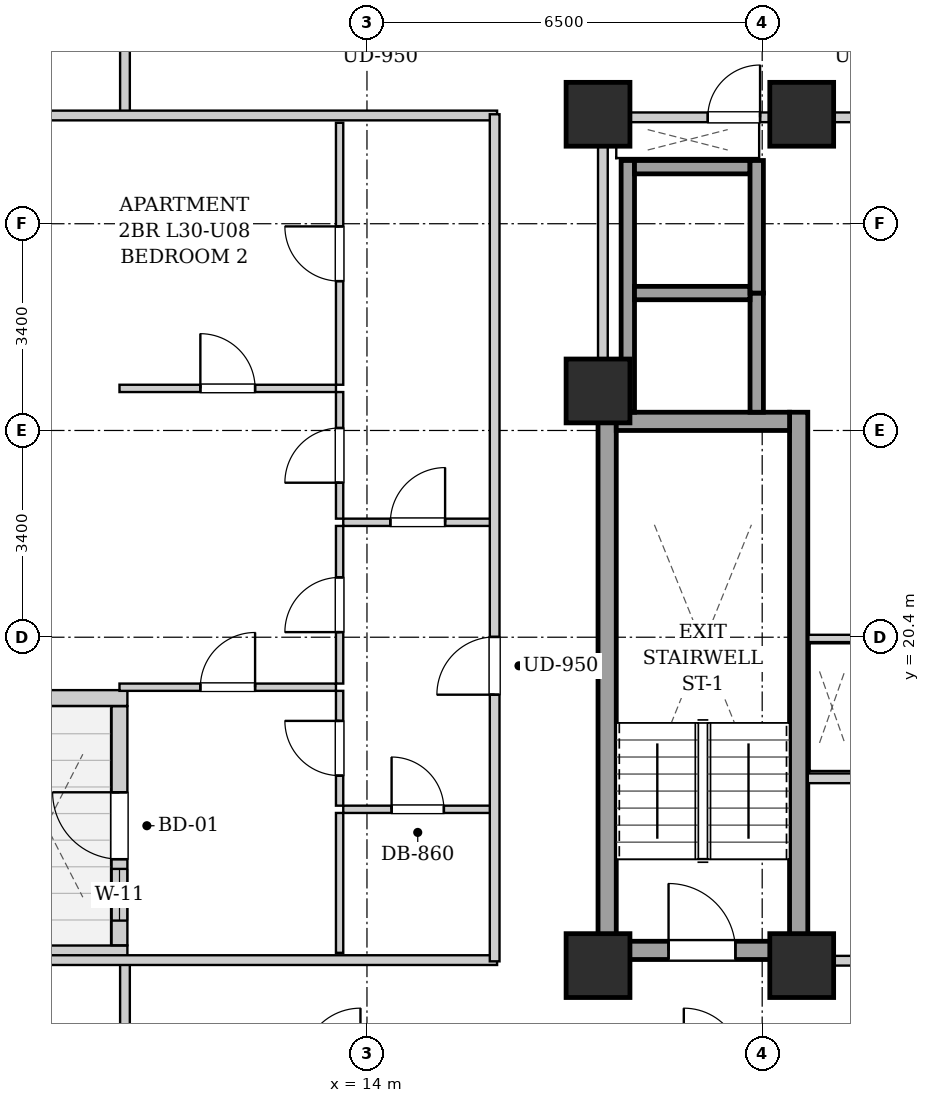
"""IFC4 building model, lengths in metres.
Left out: names, types, materials, properties, quantities, classifications, styles, units other than length and angle.
Written with IfcOpenShell. Run it as: python <this file> out.ifc"""

import sys

from ifc_helpers import new_model, si_unit, direction, frame, frame_2d, origin, origin_2d, place, context, subcontext, project, spatial, rectangle, extrude, element, fill, save


model = new_model("IFC4")
c1 = context("Model", 3, precision=1e-05, world=origin(), true_north=direction((0.0, 1.0)))
c2 = subcontext(c1, "Body", "Model", "MODEL_VIEW")
j1 = project(units=[si_unit("LENGTHUNIT", "METRE"), si_unit("PLANEANGLEUNIT", "RADIAN")], contexts=[c1])
p1 = place(None, origin())
s1 = spatial("IfcSite", under=j1, at=p1, CompositionType="ELEMENT")
p2 = place(p1, origin())
s2 = spatial("IfcBuilding", under=s1, at=p2, CompositionType="ELEMENT")
p3 = place(p2, frame((0.0, 0.0, 107.1)))
s3 = spatial("IfcBuildingStorey", under=s2, at=p3, CompositionType="ELEMENT", Elevation=107.1)
for number, where, z_axis, x_axis in (
    (1, (17.8, 15.0, 0.0), (0.0, 0.0, 1.0), (1.0, 0.0, 0.0)),
    (2, (21.15, 15.0, 0.0), (0.0, 0.0, 1.0), (1.0, 0.0, 0.0)),
    (3, (17.8, 29.0, 0.0), (0.0, 0.0, 1.0), (1.0, 0.0, 0.0)),
    (4, (21.15, 29.0, 0.0), (0.0, 0.0, 1.0), (1.0, 0.0, 0.0)),
    (5, (17.8, 24.45, 0.0), (0.0, 0.0, 1.0), (1.0, 0.0, 0.0)),
):
    element("IfcColumn", number, at=place(p3, frame(where, z_axis=z_axis, x_axis=x_axis)), inside=s3, PredefinedType="COLUMN", context=c2, shape_type="SweptSolid", body=[
        extrude(rectangle(XDim=1.05, YDim=1.05, at=origin_2d()), origin(), (0.0, 0.0, 1.0), 3.2),
    ])
p4 = place(p3, frame((7.66, 15.2, 0.0), z_axis=(0.0, 0.0, 1.0), x_axis=(1.0, 0.0, 0.0)))
e6 = element("IfcWall", 6, at=p4, inside=s3, PredefinedType="SOLIDWALL", context=c2, shape_type="SweptSolid", body=[
    extrude(rectangle(XDim=2.4, YDim=0.26, at=frame_2d((1.2, 0.0))), origin(), (0.0, 0.0, 1.0), 2.94),
])
p5 = place(p3, frame((9.93, 15.334, 0.0), z_axis=(0.0, 0.0, 1.0), x_axis=(0.0, 1.0, 0.0)))
e7 = element("IfcWall", 7, at=p5, inside=s3, PredefinedType="SOLIDWALL", context=c2, shape_type="SweptSolid", body=[
    extrude(rectangle(XDim=3.932, YDim=0.26, at=frame_2d((1.966, 0.0))), origin(), (0.0, 0.0, 1.0), 2.94),
])
p6 = place(p5, frame((1.416, 0.0, 0.0)))
e8 = element("IfcOpeningElement", 8, at=p6, cuts=e7, PredefinedType="OPENING", context=c2, shape_type="SweptSolid", body=[
    extrude(rectangle(XDim=1.1, YDim=2.0, at=frame_2d((0.55, 1.0))), frame((0.0, 0.14, 0.0), z_axis=(0.0, -1.0, 0.0), x_axis=(1.0, 0.0, 0.0)), (0.0, 0.0, 1.0), 0.28),
])
p7 = place(p5, frame((0.406, 0.0, 0.55)))
e9 = element("IfcOpeningElement", 9, at=p7, cuts=e7, PredefinedType="OPENING", context=c2, shape_type="SweptSolid", body=[
    extrude(rectangle(XDim=0.85, YDim=1.2, at=frame_2d((0.425, 0.6))), frame((0.0, 0.14, 0.0), z_axis=(0.0, -1.0, 0.0), x_axis=(1.0, 0.0, 0.0)), (0.0, 0.0, 1.0), 0.28),
])
p8 = place(p3, frame((10.06, 19.4, 0.0), z_axis=(0.0, 0.0, 1.0), x_axis=(-1.0, 0.0, 0.0)))
e10 = element("IfcWall", 10, at=p8, inside=s3, PredefinedType="SOLIDWALL", context=c2, shape_type="SweptSolid", body=[
    extrude(rectangle(XDim=2.4, YDim=0.26, at=frame_2d((1.2, 0.0))), origin(), (0.0, 0.0, 1.0), 2.94),
])
for number, where, z_axis, x_axis in (
    (11, (17.95, 15.1, 0.0), (0.0, 0.0, 1.0), (0.0, 1.0, 0.0)),
    (12, (21.1, 15.1, 0.0), (0.0, 0.0, 1.0), (0.0, 1.0, 0.0)),
):
    element("IfcWall", number, at=place(p3, frame(where, z_axis=z_axis, x_axis=x_axis)), inside=s3, PredefinedType="SHEAR", context=c2, shape_type="SweptSolid", body=[
        extrude(rectangle(XDim=9.0, YDim=0.3, at=frame_2d((4.5, 0.0))), origin(), (0.0, 0.0, 1.0), 2.94),
    ])
p9 = place(p3, frame((18.1, 23.95, 0.0), z_axis=(0.0, 0.0, 1.0), x_axis=(1.0, 0.0, 0.0)))
e13 = element("IfcWall", 13, at=p9, inside=s3, PredefinedType="SHEAR", context=c2, shape_type="SweptSolid", body=[
    extrude(rectangle(XDim=2.85, YDim=0.3, at=frame_2d((1.425, 0.0))), origin(), (0.0, 0.0, 1.0), 2.94),
])
p10 = place(p3, frame((18.1, 15.25, 0.0), z_axis=(0.0, 0.0, 1.0), x_axis=(1.0, 0.0, 0.0)))
e14 = element("IfcWall", 14, at=p10, inside=s3, PredefinedType="SHEAR", context=c2, shape_type="SweptSolid", body=[
    extrude(rectangle(XDim=2.85, YDim=0.3, at=frame_2d((1.425, 0.0))), origin(), (0.0, 0.0, 1.0), 2.94),
])
p11 = place(p10, frame((0.86, 0.0, 0.0)))
e15 = element("IfcOpeningElement", 15, at=p11, cuts=e14, PredefinedType="OPENING", context=c2, shape_type="SweptSolid", body=[
    extrude(rectangle(XDim=1.1, YDim=2.05, at=frame_2d((0.55, 1.025))), frame((0.0, 0.16, 0.0), z_axis=(0.0, -1.0, 0.0), x_axis=(1.0, 0.0, 0.0)), (0.0, 0.0, 1.0), 0.32),
])
p12 = place(p3, frame((18.29, 24.1, 0.0), z_axis=(0.0, 0.0, 1.0), x_axis=(0.0, 1.0, 0.0)))
e16 = element("IfcWall", 16, at=p12, inside=s3, PredefinedType="SHEAR", context=c2, shape_type="SweptSolid", body=[
    extrude(rectangle(XDim=4.14, YDim=0.22, at=frame_2d((2.07, 0.0))), origin(), (0.0, 0.0, 1.0), 2.94),
])
p13 = place(p3, frame((20.41, 24.1, 0.0), z_axis=(0.0, 0.0, 1.0), x_axis=(0.0, 1.0, 0.0)))
e17 = element("IfcWall", 17, at=p13, inside=s3, PredefinedType="SHEAR", context=c2, shape_type="SweptSolid", body=[
    extrude(rectangle(XDim=1.96, YDim=0.22, at=frame_2d((0.98, 0.0))), origin(), (0.0, 0.0, 1.0), 2.94),
])
for number, where, z_axis, x_axis in (
    (18, (18.4, 26.06, 0.0), (0.0, 0.0, 1.0), (1.0, 0.0, 0.0)),
    (19, (18.4, 28.13, 0.0), (0.0, 0.0, 1.0), (1.0, 0.0, 0.0)),
):
    element("IfcWall", number, at=place(p3, frame(where, z_axis=z_axis, x_axis=x_axis)), inside=s3, PredefinedType="SHEAR", context=c2, shape_type="SweptSolid", body=[
        extrude(rectangle(XDim=1.9, YDim=0.22, at=frame_2d((0.95, 0.0))), origin(), (0.0, 0.0, 1.0), 2.94),
    ])
p14 = place(p3, frame((20.41, 26.06, 0.0), z_axis=(0.0, 0.0, 1.0), x_axis=(0.0, 1.0, 0.0)))
e20 = element("IfcWall", 20, at=p14, inside=s3, PredefinedType="SHEAR", context=c2, shape_type="SweptSolid", body=[
    extrude(rectangle(XDim=2.18, YDim=0.22, at=frame_2d((1.09, 0.0))), origin(), (0.0, 0.0, 1.0), 2.94),
])
p15 = place(p3, frame((21.25, 15.08, 0.0), z_axis=(0.0, 0.0, 1.0), x_axis=(1.0, 0.0, 0.0)))
e21 = element("IfcWall", 21, at=p15, inside=s3, PredefinedType="PARTITIONING", context=c2, shape_type="SweptSolid", body=[
    extrude(rectangle(XDim=8.5, YDim=0.16, at=frame_2d((4.25, 0.0))), origin(), (0.0, 0.0, 1.0), 2.313),
])
p16 = place(p15, frame((3.725, 0.0, 0.0)))
e22 = element("IfcOpeningElement", 22, at=p16, cuts=e21, PredefinedType="OPENING", context=c2, shape_type="SweptSolid", body=[
    extrude(rectangle(XDim=1.05, YDim=2.05, at=frame_2d((0.525, 1.025))), frame((0.0, 0.09, 0.0), z_axis=(0.0, -1.0, 0.0), x_axis=(1.0, 0.0, 0.0)), (0.0, 0.0, 1.0), 0.18),
])
p17 = place(p3, frame((21.25, 18.08, 0.0), z_axis=(0.0, 0.0, 1.0), x_axis=(1.0, 0.0, 0.0)))
e23 = element("IfcWall", 23, at=p17, inside=s3, PredefinedType="PARTITIONING", context=c2, shape_type="SweptSolid", body=[
    extrude(rectangle(XDim=1.1, YDim=0.16, at=frame_2d((0.55, 0.0))), origin(), (0.0, 0.0, 1.0), 2.94),
])
p18 = place(p3, frame((17.88, 24.12, 0.0), z_axis=(0.0, 0.0, 1.0), x_axis=(0.0, 1.0, 0.0)))
e24 = element("IfcWall", 24, at=p18, inside=s3, PredefinedType="PARTITIONING", context=c2, shape_type="SweptSolid", body=[
    extrude(rectangle(XDim=4.76, YDim=0.16, at=frame_2d((2.38, 0.0))), origin(), (0.0, 0.0, 1.0), 2.275),
])
p19 = place(p3, frame((17.96, 28.95, 0.0), z_axis=(0.0, 0.0, 1.0), x_axis=(1.0, 0.0, 0.0)))
e25 = element("IfcWall", 25, at=p19, inside=s3, PredefinedType="PARTITIONING", context=c2, shape_type="SweptSolid", body=[
    extrude(rectangle(XDim=4.29, YDim=0.16, at=frame_2d((2.145, 0.0))), origin(), (0.0, 0.0, 1.0), 2.313),
])
p20 = place(p19, frame((1.645, 0.0, 0.0)))
e26 = element("IfcOpeningElement", 26, at=p20, cuts=e25, PredefinedType="OPENING", context=c2, shape_type="SweptSolid", body=[
    extrude(rectangle(XDim=0.86, YDim=2.05, at=frame_2d((0.43, 1.025))), frame((0.0, 0.09, 0.0), z_axis=(0.0, -1.0, 0.0), x_axis=(1.0, 0.0, 0.0)), (0.0, 0.0, 1.0), 0.18),
])
p21 = place(p3, frame((22.28, 20.38, 0.0), z_axis=(0.0, 0.0, 1.0), x_axis=(-1.0, 0.0, 0.0)))
e27 = element("IfcWall", 27, at=p21, inside=s3, PredefinedType="PARTITIONING", context=c2, shape_type="SweptSolid", body=[
    extrude(rectangle(XDim=1.02, YDim=0.12, at=frame_2d((0.51, 0.0))), origin(), (0.0, 0.0, 1.0), 2.94),
])
for number, where, z_axis, x_axis in (
    (28, (10.02, 13.35, 0.0), (0.0, 0.0, 1.0), (0.0, 1.0, 0.0)),
    (29, (10.02, 28.98, 0.0), (0.0, 0.0, 1.0), (0.0, 1.0, 0.0)),
):
    element("IfcWall", number, at=place(p3, frame(where, z_axis=z_axis, x_axis=x_axis)), inside=s3, PredefinedType="PARTITIONING", context=c2, shape_type="SweptSolid", body=[
        extrude(rectangle(XDim=1.74, YDim=0.16, at=frame_2d((0.87, 0.0))), origin(), (0.0, 0.0, 1.0), 2.94),
    ])
for number, where, z_axis, x_axis in (
    (30, (7.78, 15.09, 0.0), (0.0, 0.0, 1.0), (1.0, 0.0, 0.0)),
    (31, (7.78, 28.98, 0.0), (0.0, 0.0, 1.0), (1.0, 0.0, 0.0)),
):
    element("IfcWall", number, at=place(p3, frame(where, z_axis=z_axis, x_axis=x_axis)), inside=s3, PredefinedType="PARTITIONING", context=c2, shape_type="SweptSolid", body=[
        extrude(rectangle(XDim=8.36, YDim=0.16, at=frame_2d((4.18, 0.0))), origin(), (0.0, 0.0, 1.0), 2.313),
    ])
p22 = place(p3, frame((13.61, 22.29, 0.0), z_axis=(0.0, 0.0, 1.0), x_axis=(1.0, 0.0, 0.0)))
e32 = element("IfcWall", 32, at=p22, inside=s3, PredefinedType="PARTITIONING", context=c2, shape_type="SweptSolid", body=[
    extrude(rectangle(XDim=2.45, YDim=0.12, at=frame_2d((1.225, 0.0))), origin(), (0.0, 0.0, 1.0), 2.94),
])
p23 = place(p22, frame((0.775, 0.0, 0.0)))
e33 = element("IfcOpeningElement", 33, at=p23, cuts=e32, PredefinedType="OPENING", context=c2, shape_type="SweptSolid", body=[
    extrude(rectangle(XDim=0.9, YDim=2.05, at=frame_2d((0.45, 1.025))), frame((0.0, 0.07, 0.0), z_axis=(0.0, -1.0, 0.0), x_axis=(1.0, 0.0, 0.0)), (0.0, 0.0, 1.0), 0.14),
])
p24 = place(p3, frame((13.55, 22.35, 0.0), z_axis=(0.0, 0.0, 1.0), x_axis=(0.0, 1.0, 0.0)))
e34 = element("IfcWall", 34, at=p24, inside=s3, PredefinedType="PARTITIONING", context=c2, shape_type="SweptSolid", body=[
    extrude(rectangle(XDim=2.082, YDim=0.12, at=frame_2d((1.041, 0.0))), origin(), (0.0, 0.0, 1.0), 2.94),
])
p25 = place(p24, frame((0.591, 0.0, 0.0)))
e35 = element("IfcOpeningElement", 35, at=p25, cuts=e34, PredefinedType="OPENING", context=c2, shape_type="SweptSolid", body=[
    extrude(rectangle(XDim=0.9, YDim=2.05, at=frame_2d((0.45, 1.025))), frame((0.0, 0.07, 0.0), z_axis=(0.0, -1.0, 0.0), x_axis=(1.0, 0.0, 0.0)), (0.0, 0.0, 1.0), 0.14),
])
p26 = place(p3, frame((13.55, 24.552, 0.0), z_axis=(0.0, 0.0, 1.0), x_axis=(0.0, 1.0, 0.0)))
e36 = element("IfcWall", 36, at=p26, inside=s3, PredefinedType="PARTITIONING", context=c2, shape_type="SweptSolid", body=[
    extrude(rectangle(XDim=4.308, YDim=0.12, at=frame_2d((2.154, 0.0))), origin(), (0.0, 0.0, 1.0), 2.94),
])
p27 = place(p26, frame((1.704, 0.0, 0.0)))
e37 = element("IfcOpeningElement", 37, at=p27, cuts=e36, PredefinedType="OPENING", context=c2, shape_type="SweptSolid", body=[
    extrude(rectangle(XDim=0.9, YDim=2.05, at=frame_2d((0.45, 1.025))), frame((0.0, 0.07, 0.0), z_axis=(0.0, -1.0, 0.0), x_axis=(1.0, 0.0, 0.0)), (0.0, 0.0, 1.0), 0.14),
])
p28 = place(p3, frame((13.61, 17.57, 0.0), z_axis=(0.0, 0.0, 1.0), x_axis=(1.0, 0.0, 0.0)))
e38 = element("IfcWall", 38, at=p28, inside=s3, PredefinedType="PARTITIONING", context=c2, shape_type="SweptSolid", body=[
    extrude(rectangle(XDim=2.45, YDim=0.12, at=frame_2d((1.225, 0.0))), origin(), (0.0, 0.0, 1.0), 2.94),
])
p29 = place(p28, frame((0.795, 0.0, 0.0)))
e39 = element("IfcOpeningElement", 39, at=p29, cuts=e38, PredefinedType="OPENING", context=c2, shape_type="SweptSolid", body=[
    extrude(rectangle(XDim=0.86, YDim=2.05, at=frame_2d((0.43, 1.025))), frame((0.0, 0.07, 0.0), z_axis=(0.0, -1.0, 0.0), x_axis=(1.0, 0.0, 0.0)), (0.0, 0.0, 1.0), 0.14),
])
p30 = place(p3, frame((13.55, 15.21, 0.0), z_axis=(0.0, 0.0, 1.0), x_axis=(0.0, 1.0, 0.0)))
e40 = element("IfcWall", 40, at=p30, inside=s3, PredefinedType="PARTITIONING", context=c2, shape_type="SweptSolid", body=[
    extrude(rectangle(XDim=2.3, YDim=0.12, at=frame_2d((1.15, 0.0))), origin(), (0.0, 0.0, 1.0), 2.94),
])
p31 = place(p3, frame((13.55, 17.63, 0.0), z_axis=(0.0, 0.0, 1.0), x_axis=(0.0, 1.0, 0.0)))
e41 = element("IfcWall", 41, at=p31, inside=s3, PredefinedType="PARTITIONING", context=c2, shape_type="SweptSolid", body=[
    extrude(rectangle(XDim=1.888, YDim=0.12, at=frame_2d((0.944, 0.0))), origin(), (0.0, 0.0, 1.0), 2.94),
])
p32 = place(p31, frame((0.494, 0.0, 0.0)))
e42 = element("IfcOpeningElement", 42, at=p32, cuts=e41, PredefinedType="OPENING", context=c2, shape_type="SweptSolid", body=[
    extrude(rectangle(XDim=0.9, YDim=2.05, at=frame_2d((0.45, 1.025))), frame((0.0, 0.07, 0.0), z_axis=(0.0, -1.0, 0.0), x_axis=(1.0, 0.0, 0.0)), (0.0, 0.0, 1.0), 0.14),
])
p33 = place(p3, frame((13.55, 19.638, 0.0), z_axis=(0.0, 0.0, 1.0), x_axis=(0.0, 1.0, 0.0)))
e43 = element("IfcWall", 43, at=p33, inside=s3, PredefinedType="PARTITIONING", context=c2, shape_type="SweptSolid", body=[
    extrude(rectangle(XDim=2.592, YDim=0.12, at=frame_2d((1.296, 0.0))), origin(), (0.0, 0.0, 1.0), 2.94),
])
p34 = place(p33, frame((0.846, 0.0, 0.0)))
e44 = element("IfcOpeningElement", 44, at=p34, cuts=e43, PredefinedType="OPENING", context=c2, shape_type="SweptSolid", body=[
    extrude(rectangle(XDim=0.9, YDim=2.05, at=frame_2d((0.45, 1.025))), frame((0.0, 0.07, 0.0), z_axis=(0.0, -1.0, 0.0), x_axis=(1.0, 0.0, 0.0)), (0.0, 0.0, 1.0), 0.14),
])
p35 = place(p3, frame((9.93, 19.578, 0.0), z_axis=(0.0, 0.0, 1.0), x_axis=(1.0, 0.0, 0.0)))
e45 = element("IfcWall", 45, at=p35, inside=s3, PredefinedType="PARTITIONING", context=c2, shape_type="SweptSolid", body=[
    extrude(rectangle(XDim=3.56, YDim=0.12, at=frame_2d((1.78, 0.0))), origin(), (0.0, 0.0, 1.0), 2.94),
])
p36 = place(p35, frame((1.33, 0.0, 0.0)))
e46 = element("IfcOpeningElement", 46, at=p36, cuts=e45, PredefinedType="OPENING", context=c2, shape_type="SweptSolid", body=[
    extrude(rectangle(XDim=0.9, YDim=2.05, at=frame_2d((0.45, 1.025))), frame((0.0, 0.07, 0.0), z_axis=(0.0, -1.0, 0.0), x_axis=(1.0, 0.0, 0.0)), (0.0, 0.0, 1.0), 0.14),
])
p37 = place(p3, frame((9.93, 24.492, 0.0), z_axis=(0.0, 0.0, 1.0), x_axis=(1.0, 0.0, 0.0)))
e47 = element("IfcWall", 47, at=p37, inside=s3, PredefinedType="PARTITIONING", context=c2, shape_type="SweptSolid", body=[
    extrude(rectangle(XDim=3.56, YDim=0.12, at=frame_2d((1.78, 0.0))), origin(), (0.0, 0.0, 1.0), 2.518),
])
p38 = place(p37, frame((1.33, 0.0, 0.0)))
e48 = element("IfcOpeningElement", 48, at=p38, cuts=e47, PredefinedType="OPENING", context=c2, shape_type="SweptSolid", body=[
    extrude(rectangle(XDim=0.9, YDim=2.05, at=frame_2d((0.45, 1.025))), frame((0.0, 0.07, 0.0), z_axis=(0.0, -1.0, 0.0), x_axis=(1.0, 0.0, 0.0)), (0.0, 0.0, 1.0), 0.14),
])
p39 = place(p3, frame((16.1, 15.07, 0.0), z_axis=(0.0, 0.0, 1.0), x_axis=(0.0, 1.0, 0.0)))
e49 = element("IfcWall", 49, at=p39, inside=s3, PredefinedType="PARTITIONING", context=c2, shape_type="SweptSolid", body=[
    extrude(rectangle(XDim=13.93, YDim=0.16, at=frame_2d((6.965, 0.0))), origin(), (0.0, 0.0, 1.0), 2.94),
])
p40 = place(p39, frame((4.385, 0.0, 0.0)))
e50 = element("IfcOpeningElement", 50, at=p40, cuts=e49, PredefinedType="OPENING", context=c2, shape_type="SweptSolid", body=[
    extrude(rectangle(XDim=0.95, YDim=2.1, at=frame_2d((0.475, 1.05))), frame((0.0, 0.09, 0.0), z_axis=(0.0, -1.0, 0.0), x_axis=(1.0, 0.0, 0.0)), (0.0, 0.0, 1.0), 0.18),
])
p41 = place(p11, origin())
e51 = element("IfcDoor", 51, at=p41, inside=s3, OperationType="SINGLE_SWING_LEFT", PredefinedType="DOOR", context=c2, shape_type="SweptSolid", body=[
    extrude(rectangle(XDim=1.1, YDim=2.05, at=frame_2d((0.55, 1.025))), frame((0.0, 0.025, 0.0), z_axis=(0.0, -1.0, 0.0), x_axis=(1.0, 0.0, 0.0)), (0.0, 0.0, 1.0), 0.05),
])
fill(e15, e51)
p42 = place(p20, origin())
e52 = element("IfcDoor", 52, at=p42, inside=s3, OperationType="SINGLE_SWING_RIGHT", PredefinedType="DOOR", context=c2, shape_type="SweptSolid", body=[
    extrude(rectangle(XDim=0.86, YDim=2.05, at=frame_2d((0.43, 1.025))), frame((0.0, 0.025, 0.0), z_axis=(0.0, -1.0, 0.0), x_axis=(1.0, 0.0, 0.0)), (0.0, 0.0, 1.0), 0.05),
])
fill(e26, e52)
p43 = place(p23, origin())
e53 = element("IfcDoor", 53, at=p43, inside=s3, OperationType="SINGLE_SWING_RIGHT", PredefinedType="DOOR", context=c2, shape_type="SweptSolid", body=[
    extrude(rectangle(XDim=0.9, YDim=2.05, at=frame_2d((0.45, 1.025))), frame((0.0, 0.025, 0.0), z_axis=(0.0, -1.0, 0.0), x_axis=(1.0, 0.0, 0.0)), (0.0, 0.0, 1.0), 0.05),
])
fill(e33, e53)
p44 = place(p25, origin())
e54 = element("IfcDoor", 54, at=p44, inside=s3, OperationType="SINGLE_SWING_LEFT", PredefinedType="DOOR", context=c2, shape_type="SweptSolid", body=[
    extrude(rectangle(XDim=0.9, YDim=2.05, at=frame_2d((0.45, 1.025))), frame((0.0, 0.025, 0.0), z_axis=(0.0, -1.0, 0.0), x_axis=(1.0, 0.0, 0.0)), (0.0, 0.0, 1.0), 0.05),
])
fill(e35, e54)
p45 = place(p27, origin())
e55 = element("IfcDoor", 55, at=p45, inside=s3, OperationType="SINGLE_SWING_RIGHT", PredefinedType="DOOR", context=c2, shape_type="SweptSolid", body=[
    extrude(rectangle(XDim=0.9, YDim=2.05, at=frame_2d((0.45, 1.025))), frame((0.0, 0.025, 0.0), z_axis=(0.0, -1.0, 0.0), x_axis=(1.0, 0.0, 0.0)), (0.0, 0.0, 1.0), 0.05),
])
fill(e37, e55)
p46 = place(p29, origin())
e56 = element("IfcDoor", 56, at=p46, inside=s3, OperationType="SINGLE_SWING_LEFT", PredefinedType="DOOR", context=c2, shape_type="SweptSolid", body=[
    extrude(rectangle(XDim=0.86, YDim=2.05, at=frame_2d((0.43, 1.025))), frame((0.0, 0.025, 0.0), z_axis=(0.0, -1.0, 0.0), x_axis=(1.0, 0.0, 0.0)), (0.0, 0.0, 1.0), 0.05),
])
fill(e39, e56)
p47 = place(p32, origin())
e57 = element("IfcDoor", 57, at=p47, inside=s3, OperationType="SINGLE_SWING_RIGHT", PredefinedType="DOOR", context=c2, shape_type="SweptSolid", body=[
    extrude(rectangle(XDim=0.9, YDim=2.05, at=frame_2d((0.45, 1.025))), frame((0.0, 0.025, 0.0), z_axis=(0.0, -1.0, 0.0), x_axis=(1.0, 0.0, 0.0)), (0.0, 0.0, 1.0), 0.05),
])
fill(e42, e57)
p48 = place(p34, origin())
e58 = element("IfcDoor", 58, at=p48, inside=s3, OperationType="SINGLE_SWING_LEFT", PredefinedType="DOOR", context=c2, shape_type="SweptSolid", body=[
    extrude(rectangle(XDim=0.9, YDim=2.05, at=frame_2d((0.45, 1.025))), frame((0.0, 0.025, 0.0), z_axis=(0.0, -1.0, 0.0), x_axis=(1.0, 0.0, 0.0)), (0.0, 0.0, 1.0), 0.05),
])
fill(e44, e58)
p49 = place(p36, origin())
e59 = element("IfcDoor", 59, at=p49, inside=s3, OperationType="SINGLE_SWING_RIGHT", PredefinedType="DOOR", context=c2, shape_type="SweptSolid", body=[
    extrude(rectangle(XDim=0.9, YDim=2.05, at=frame_2d((0.45, 1.025))), frame((0.0, 0.025, 0.0), z_axis=(0.0, -1.0, 0.0), x_axis=(1.0, 0.0, 0.0)), (0.0, 0.0, 1.0), 0.05),
])
fill(e46, e59)
p50 = place(p38, origin())
e60 = element("IfcDoor", 60, at=p50, inside=s3, OperationType="SINGLE_SWING_LEFT", PredefinedType="DOOR", context=c2, shape_type="SweptSolid", body=[
    extrude(rectangle(XDim=0.9, YDim=2.05, at=frame_2d((0.45, 1.025))), frame((0.0, 0.025, 0.0), z_axis=(0.0, -1.0, 0.0), x_axis=(1.0, 0.0, 0.0)), (0.0, 0.0, 1.0), 0.05),
])
fill(e48, e60)
p51 = place(p40, origin())
e61 = element("IfcDoor", 61, at=p51, inside=s3, OperationType="SINGLE_SWING_LEFT", PredefinedType="DOOR", context=c2, shape_type="SweptSolid", body=[
    extrude(rectangle(XDim=0.95, YDim=2.1, at=frame_2d((0.475, 1.05))), frame((0.0, 0.025, 0.0), z_axis=(0.0, -1.0, 0.0), x_axis=(1.0, 0.0, 0.0)), (0.0, 0.0, 1.0), 0.05),
])
fill(e50, e61)
p52 = place(p6, origin())
e62 = element("IfcDoor", 62, at=p52, inside=s3, OperationType="SINGLE_SWING_RIGHT", PredefinedType="DOOR", context=c2, shape_type="SweptSolid", body=[
    extrude(rectangle(XDim=1.1, YDim=2.0, at=frame_2d((0.55, 1.0))), frame((0.0, 0.025, 0.0), z_axis=(0.0, -1.0, 0.0), x_axis=(1.0, 0.0, 0.0)), (0.0, 0.0, 1.0), 0.05),
])
fill(e8, e62)
p53 = place(p7, origin())
e63 = element("IfcWindow", 63, at=p53, inside=s3, PartitioningType="SINGLE_PANEL", PredefinedType="WINDOW", context=c2, shape_type="SweptSolid", body=[
    extrude(rectangle(XDim=0.85, YDim=1.2, at=frame_2d((0.425, 0.6))), frame((0.0, 0.03, 0.0), z_axis=(0.0, -1.0, 0.0), x_axis=(1.0, 0.0, 0.0)), (0.0, 0.0, 1.0), 0.06),
])
fill(e9, e63)
save(model, sys.argv[1])
